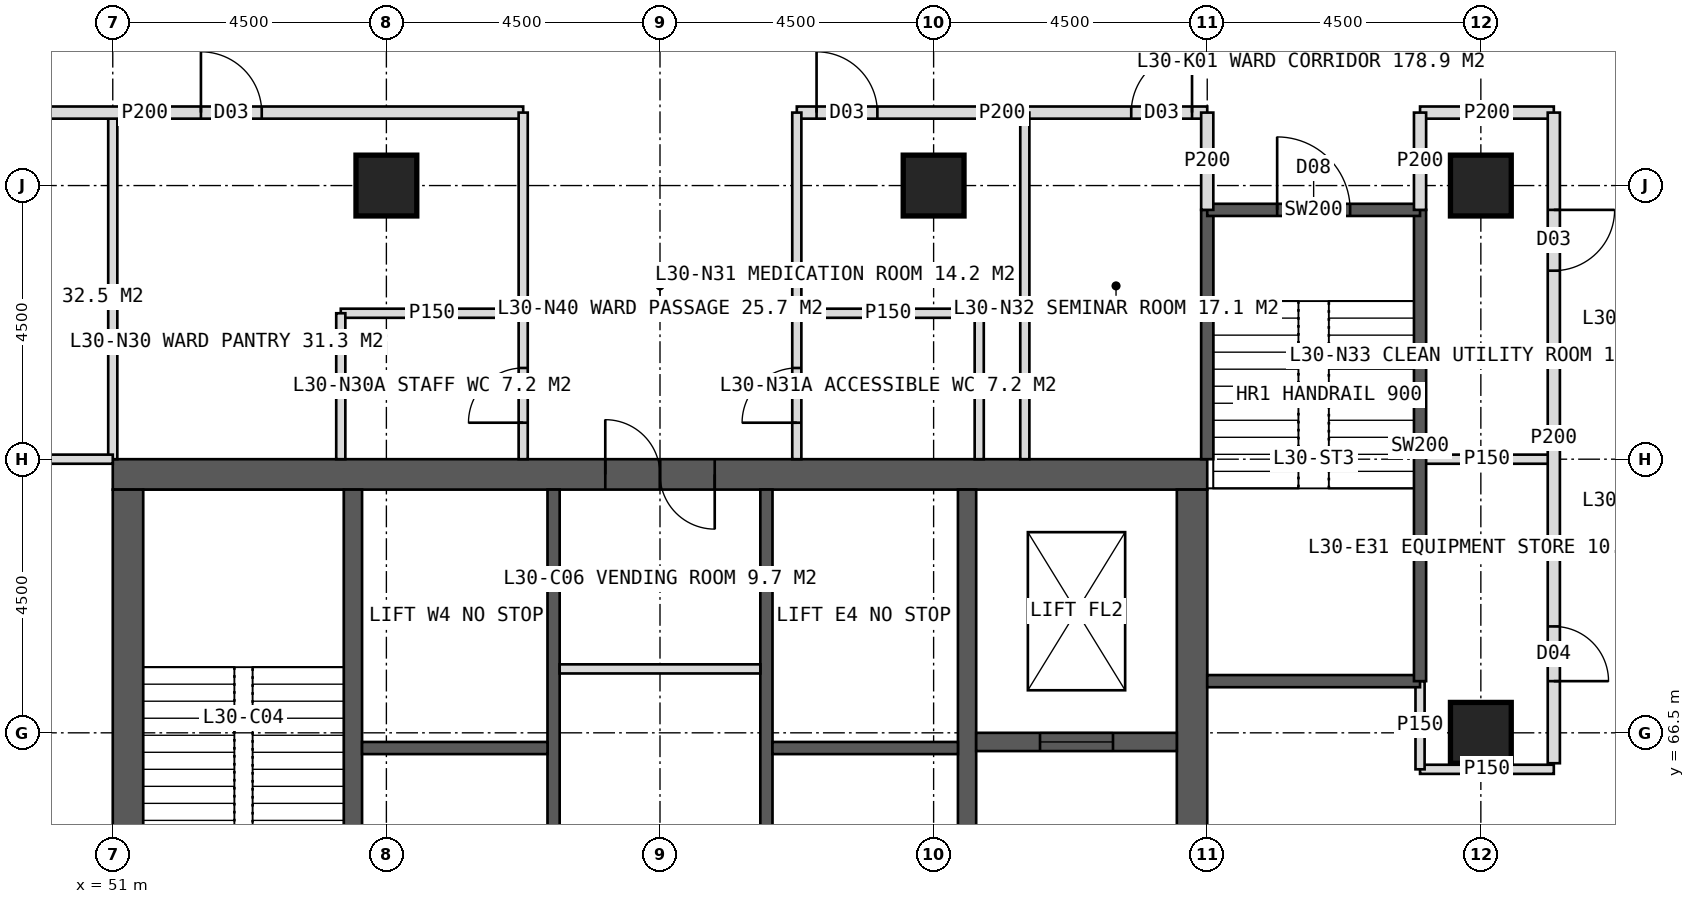
"""IFC4 building model, lengths in metres.
Left out: names, types, materials, properties, quantities, classifications, styles, units other than length and angle.
Written with IfcOpenShell. Run it as: python <this file> out.ifc"""

import sys

from ifc_helpers import new_model, si_unit, direction, frame, frame_2d, origin, origin_2d, place, context, subcontext, project, spatial, rectangle, hollow_rectangle, extrude, element, fill, save


model = new_model("IFC4")
c1 = context("Model", 3, precision=1e-05, world=origin(), true_north=direction((0.0, 1.0)))
c2 = subcontext(c1, "Body", "Model", "MODEL_VIEW")
j1 = project(units=[si_unit("LENGTHUNIT", "METRE"), si_unit("PLANEANGLEUNIT", "RADIAN")], contexts=[c1])
p1 = place(None, origin())
s1 = spatial("IfcSite", under=j1, at=p1, CompositionType="ELEMENT")
p2 = place(p1, origin())
s2 = spatial("IfcBuilding", under=s1, at=p2, CompositionType="ELEMENT")
p3 = place(p2, frame((0.0, 0.0, 128.0)))
s3 = spatial("IfcBuildingStorey", under=s2, at=p3, CompositionType="ELEMENT", Elevation=128.0)
p4 = place(p3, frame((51.0, 70.75, 0.0), z_axis=(0.0, 0.0, 1.0), x_axis=(1.0, 0.0, 0.0)))
e1 = element("IfcWall", 1, at=p4, inside=s3, PredefinedType="SHEAR", context=c2, shape_type="SweptSolid", body=[
    extrude(rectangle(XDim=18.0, YDim=0.5, at=frame_2d((9.0, 0.0))), origin(), (0.0, 0.0, 1.0), 4.0),
])
p5 = place(p4, frame((8.1, 0.0, 0.0)))
e2 = element("IfcOpeningElement", 2, at=p5, cuts=e1, PredefinedType="OPENING", context=c2, shape_type="SweptSolid", body=[
    extrude(rectangle(XDim=1.8, YDim=2.2, at=frame_2d((0.9, 1.1))), frame((0.0, 0.26, 0.0), z_axis=(0.0, -1.0, 0.0), x_axis=(1.0, 0.0, 0.0)), (0.0, 0.0, 1.0), 0.52),
])
p6 = place(p3, frame((51.25, 53.5, 0.0), z_axis=(0.0, 0.0, 1.0), x_axis=(0.0, 1.0, 0.0)))
e3 = element("IfcWall", 3, at=p6, inside=s3, PredefinedType="SHEAR", context=c2, shape_type="SweptSolid", body=[
    extrude(rectangle(XDim=17.0, YDim=0.5, at=frame_2d((8.5, 0.0))), origin(), (0.0, 0.0, 1.0), 4.0),
])
p7 = place(p6, frame((6.0, 0.0, 0.0)))
e4 = element("IfcOpeningElement", 4, at=p7, cuts=e3, PredefinedType="OPENING", context=c2, shape_type="SweptSolid", body=[
    extrude(rectangle(XDim=1.5, YDim=2.2, at=frame_2d((0.75, 1.1))), frame((0.0, 0.26, 0.0), z_axis=(0.0, -1.0, 0.0), x_axis=(1.0, 0.0, 0.0)), (0.0, 0.0, 1.0), 0.52),
])
p8 = place(p3, frame((68.75, 53.5, 0.0), z_axis=(0.0, 0.0, 1.0), x_axis=(0.0, 1.0, 0.0)))
e5 = element("IfcWall", 5, at=p8, inside=s3, PredefinedType="SHEAR", context=c2, shape_type="SweptSolid", body=[
    extrude(rectangle(XDim=17.0, YDim=0.5, at=frame_2d((8.5, 0.0))), origin(), (0.0, 0.0, 1.0), 4.0),
])
p9 = place(p8, frame((9.5, 0.0, 0.0)))
e6 = element("IfcOpeningElement", 6, at=p9, cuts=e5, PredefinedType="OPENING", context=c2, shape_type="SweptSolid", body=[
    extrude(rectangle(XDim=1.5, YDim=2.2, at=frame_2d((0.75, 1.1))), frame((0.0, 0.26, 0.0), z_axis=(0.0, -1.0, 0.0), x_axis=(1.0, 0.0, 0.0)), (0.0, 0.0, 1.0), 0.52),
])
for number, where, z_axis, x_axis in (
    (7, (54.95, 53.5, 0.0), (0.0, 0.0, 1.0), (0.0, 1.0, 0.0)),
    (8, (65.05, 53.5, 0.0), (0.0, 0.0, 1.0), (0.0, 1.0, 0.0)),
):
    element("IfcWall", number, at=place(p3, frame(where, z_axis=z_axis, x_axis=x_axis)), inside=s3, PredefinedType="SHEAR", context=c2, shape_type="SweptSolid", body=[
        extrude(rectangle(XDim=17.0, YDim=0.3, at=frame_2d((8.5, 0.0))), origin(), (0.0, 0.0, 1.0), 4.0),
    ])
p10 = place(p3, frame((58.25, 53.5, 0.0), z_axis=(0.0, 0.0, 1.0), x_axis=(0.0, 1.0, 0.0)))
e9 = element("IfcWall", 9, at=p10, inside=s3, PredefinedType="SHEAR", context=c2, shape_type="SweptSolid", body=[
    extrude(rectangle(XDim=17.0, YDim=0.2, at=frame_2d((8.5, 0.0))), origin(), (0.0, 0.0, 1.0), 4.0),
])
p11 = place(p10, frame((1.375, 0.0, 0.0)))
e10 = element("IfcOpeningElement", 10, at=p11, cuts=e9, PredefinedType="OPENING", context=c2, shape_type="SweptSolid", body=[
    extrude(rectangle(XDim=1.4, YDim=2.2, at=frame_2d((0.7, 1.1))), frame((0.0, 0.11, 0.0), z_axis=(0.0, -1.0, 0.0), x_axis=(1.0, 0.0, 0.0)), (0.0, 0.0, 1.0), 0.22),
])
p12 = place(p10, frame((5.675, 0.0, 0.0)))
e11 = element("IfcOpeningElement", 11, at=p12, cuts=e9, PredefinedType="OPENING", context=c2, shape_type="SweptSolid", body=[
    extrude(rectangle(XDim=1.4, YDim=2.2, at=frame_2d((0.7, 1.1))), frame((0.0, 0.11, 0.0), z_axis=(0.0, -1.0, 0.0), x_axis=(1.0, 0.0, 0.0)), (0.0, 0.0, 1.0), 0.22),
])
p13 = place(p3, frame((61.75, 53.5, 0.0), z_axis=(0.0, 0.0, 1.0), x_axis=(0.0, 1.0, 0.0)))
e12 = element("IfcWall", 12, at=p13, inside=s3, PredefinedType="SHEAR", context=c2, shape_type="SweptSolid", body=[
    extrude(rectangle(XDim=17.0, YDim=0.2, at=frame_2d((8.5, 0.0))), origin(), (0.0, 0.0, 1.0), 4.0),
])
p14 = place(p13, frame((1.375, 0.0, 0.0)))
e13 = element("IfcOpeningElement", 13, at=p14, cuts=e12, PredefinedType="OPENING", context=c2, shape_type="SweptSolid", body=[
    extrude(rectangle(XDim=1.4, YDim=2.2, at=frame_2d((0.7, 1.1))), frame((0.0, 0.11, 0.0), z_axis=(0.0, -1.0, 0.0), x_axis=(1.0, 0.0, 0.0)), (0.0, 0.0, 1.0), 0.22),
])
p15 = place(p13, frame((5.675, 0.0, 0.0)))
e14 = element("IfcOpeningElement", 14, at=p15, cuts=e12, PredefinedType="OPENING", context=c2, shape_type="SweptSolid", body=[
    extrude(rectangle(XDim=1.4, YDim=2.2, at=frame_2d((0.7, 1.1))), frame((0.0, 0.11, 0.0), z_axis=(0.0, -1.0, 0.0), x_axis=(1.0, 0.0, 0.0)), (0.0, 0.0, 1.0), 0.22),
])
for number, where, z_axis, x_axis in (
    (15, (55.1, 66.25, 0.0), (0.0, 0.0, 1.0), (1.0, 0.0, 0.0)),
    (16, (61.85, 66.25, 0.0), (0.0, 0.0, 1.0), (1.0, 0.0, 0.0)),
):
    element("IfcWall", number, at=place(p3, frame(where, z_axis=z_axis, x_axis=x_axis)), inside=s3, PredefinedType="SHEAR", context=c2, shape_type="SweptSolid", body=[
        extrude(rectangle(XDim=3.05, YDim=0.2, at=frame_2d((1.525, 0.0))), origin(), (0.0, 0.0, 1.0), 4.0),
    ])
p16 = place(p3, frame((65.2, 66.35, 0.0), z_axis=(0.0, 0.0, 1.0), x_axis=(1.0, 0.0, 0.0)))
e17 = element("IfcWall", 17, at=p16, inside=s3, PredefinedType="SHEAR", context=c2, shape_type="SweptSolid", body=[
    extrude(rectangle(XDim=3.3, YDim=0.3, at=frame_2d((1.65, 0.0))), origin(), (0.0, 0.0, 1.0), 4.0),
])
p17 = place(p16, frame((1.05, 0.0, 0.0)))
e18 = element("IfcOpeningElement", 18, at=p17, cuts=e17, PredefinedType="OPENING", context=c2, shape_type="SweptSolid", body=[
    extrude(rectangle(XDim=1.2, YDim=2.2, at=frame_2d((0.6, 1.1))), frame((0.0, 0.16, 0.0), z_axis=(0.0, -1.0, 0.0), x_axis=(1.0, 0.0, 0.0)), (0.0, 0.0, 1.0), 0.32),
])
for number, where, z_axis, x_axis in (
    (19, (73.5, 75.5, 0.0), (0.0, 0.0, 1.0), (1.0, 0.0, 0.0)),
    (20, (55.5, 75.5, 0.0), (0.0, 0.0, 1.0), (1.0, 0.0, 0.0)),
    (21, (64.5, 75.5, 0.0), (0.0, 0.0, 1.0), (1.0, 0.0, 0.0)),
    (22, (73.5, 66.5, 0.0), (0.0, 0.0, 1.0), (1.0, 0.0, 0.0)),
):
    element("IfcColumn", number, at=place(p3, frame(where, z_axis=z_axis, x_axis=x_axis)), inside=s3, PredefinedType="COLUMN", context=c2, shape_type="SweptSolid", body=[
        extrude(hollow_rectangle(XDim=1.0, YDim=1.0, WallThickness=0.1, at=origin_2d()), origin(), (0.0, 0.0, 1.0), 4.0),
    ])
p18 = place(p3, frame((51.0, 71.0, 0.0), z_axis=(0.0, 0.0, 1.0), x_axis=(0.0, 1.0, 0.0)))
e23 = element("IfcWall", 23, at=p18, inside=s3, PredefinedType="PARTITIONING", context=c2, shape_type="SweptSolid", body=[
    extrude(rectangle(XDim=5.7, YDim=0.15, at=frame_2d((2.85, 0.0))), origin(), (0.0, 0.0, 1.0), 3.75),
])
p19 = place(p3, frame((45.3, 76.7, 0.0), z_axis=(0.0, 0.0, 1.0), x_axis=(1.0, 0.0, 0.0)))
e24 = element("IfcWall", 24, at=p19, inside=s3, PredefinedType="PARTITIONING", context=c2, shape_type="SweptSolid", body=[
    extrude(rectangle(XDim=12.45, YDim=0.2, at=frame_2d((6.225, 0.0))), origin(), (0.0, 0.0, 1.0), 3.75),
])
p20 = place(p19, frame((7.15, 0.0, 0.0)))
e25 = element("IfcOpeningElement", 25, at=p20, cuts=e24, PredefinedType="OPENING", context=c2, shape_type="SweptSolid", body=[
    extrude(rectangle(XDim=1.0, YDim=2.1, at=frame_2d((0.5, 1.05))), frame((0.0, 0.11, 0.0), z_axis=(0.0, -1.0, 0.0), x_axis=(1.0, 0.0, 0.0)), (0.0, 0.0, 1.0), 0.22),
])
p21 = place(p3, frame((62.25, 76.7, 0.0), z_axis=(0.0, 0.0, 1.0), x_axis=(1.0, 0.0, 0.0)))
e26 = element("IfcWall", 26, at=p21, inside=s3, PredefinedType="PARTITIONING", context=c2, shape_type="SweptSolid", body=[
    extrude(rectangle(XDim=6.75, YDim=0.2, at=frame_2d((3.375, 0.0))), origin(), (0.0, 0.0, 1.0), 3.75),
])
p22 = place(p21, frame((0.325, 0.0, 0.0)))
e27 = element("IfcOpeningElement", 27, at=p22, cuts=e26, PredefinedType="OPENING", context=c2, shape_type="SweptSolid", body=[
    extrude(rectangle(XDim=1.0, YDim=2.1, at=frame_2d((0.5, 1.05))), frame((0.0, 0.11, 0.0), z_axis=(0.0, -1.0, 0.0), x_axis=(1.0, 0.0, 0.0)), (0.0, 0.0, 1.0), 0.22),
])
p23 = place(p21, frame((5.5, 0.0, 0.0)))
e28 = element("IfcOpeningElement", 28, at=p23, cuts=e26, PredefinedType="OPENING", context=c2, shape_type="SweptSolid", body=[
    extrude(rectangle(XDim=1.0, YDim=2.1, at=frame_2d((0.5, 1.05))), frame((0.0, 0.11, 0.0), z_axis=(0.0, -1.0, 0.0), x_axis=(1.0, 0.0, 0.0)), (0.0, 0.0, 1.0), 0.22),
])
p24 = place(p3, frame((72.5, 76.7, 0.0), z_axis=(0.0, 0.0, 1.0), x_axis=(1.0, 0.0, 0.0)))
e29 = element("IfcWall", 29, at=p24, inside=s3, PredefinedType="PARTITIONING", context=c2, shape_type="SweptSolid", body=[
    extrude(rectangle(XDim=2.2, YDim=0.2, at=frame_2d((1.1, 0.0))), origin(), (0.0, 0.0, 1.0), 3.75),
])
p25 = place(p3, frame((57.75, 71.0, 0.0), z_axis=(0.0, 0.0, 1.0), x_axis=(0.0, 1.0, 0.0)))
e30 = element("IfcWall", 30, at=p25, inside=s3, PredefinedType="PARTITIONING", context=c2, shape_type="SweptSolid", body=[
    extrude(rectangle(XDim=5.7, YDim=0.15, at=frame_2d((2.85, 0.0))), origin(), (0.0, 0.0, 1.0), 3.75),
])
p26 = place(p25, frame((0.6, 0.0, 0.0)))
e31 = element("IfcOpeningElement", 31, at=p26, cuts=e30, PredefinedType="OPENING", context=c2, shape_type="SweptSolid", body=[
    extrude(rectangle(XDim=0.9, YDim=2.1, at=frame_2d((0.45, 1.05))), frame((0.0, 0.085, 0.0), z_axis=(0.0, -1.0, 0.0), x_axis=(1.0, 0.0, 0.0)), (0.0, 0.0, 1.0), 0.17),
])
p27 = place(p3, frame((62.25, 71.0, 0.0), z_axis=(0.0, 0.0, 1.0), x_axis=(0.0, 1.0, 0.0)))
e32 = element("IfcWall", 32, at=p27, inside=s3, PredefinedType="PARTITIONING", context=c2, shape_type="SweptSolid", body=[
    extrude(rectangle(XDim=5.7, YDim=0.15, at=frame_2d((2.85, 0.0))), origin(), (0.0, 0.0, 1.0), 3.75),
])
p28 = place(p27, frame((0.6, 0.0, 0.0)))
e33 = element("IfcOpeningElement", 33, at=p28, cuts=e32, PredefinedType="OPENING", context=c2, shape_type="SweptSolid", body=[
    extrude(rectangle(XDim=0.9, YDim=2.1, at=frame_2d((0.45, 1.05))), frame((0.0, 0.085, 0.0), z_axis=(0.0, -1.0, 0.0), x_axis=(1.0, 0.0, 0.0)), (0.0, 0.0, 1.0), 0.17),
])
p29 = place(p3, frame((66.0, 71.0, 0.0), z_axis=(0.0, 0.0, 1.0), x_axis=(0.0, 1.0, 0.0)))
e34 = element("IfcWall", 34, at=p29, inside=s3, PredefinedType="PARTITIONING", context=c2, shape_type="SweptSolid", body=[
    extrude(rectangle(XDim=5.7, YDim=0.15, at=frame_2d((2.85, 0.0))), origin(), (0.0, 0.0, 1.0), 3.75),
])
p30 = place(p3, frame((54.75, 73.4, 0.0), z_axis=(0.0, 0.0, 1.0), x_axis=(1.0, 0.0, 0.0)))
e35 = element("IfcWall", 35, at=p30, inside=s3, PredefinedType="PARTITIONING", context=c2, shape_type="SweptSolid", body=[
    extrude(rectangle(XDim=3.0, YDim=0.15, at=frame_2d((1.5, 0.0))), origin(), (0.0, 0.0, 1.0), 3.75),
])
p31 = place(p3, frame((54.75, 71.0, 0.0), z_axis=(0.0, 0.0, 1.0), x_axis=(0.0, 1.0, 0.0)))
e36 = element("IfcWall", 36, at=p31, inside=s3, PredefinedType="PARTITIONING", context=c2, shape_type="SweptSolid", body=[
    extrude(rectangle(XDim=2.4, YDim=0.15, at=frame_2d((1.2, 0.0))), origin(), (0.0, 0.0, 1.0), 3.75),
])
p32 = place(p3, frame((62.25, 73.4, 0.0), z_axis=(0.0, 0.0, 1.0), x_axis=(1.0, 0.0, 0.0)))
e37 = element("IfcWall", 37, at=p32, inside=s3, PredefinedType="PARTITIONING", context=c2, shape_type="SweptSolid", body=[
    extrude(rectangle(XDim=3.0, YDim=0.15, at=frame_2d((1.5, 0.0))), origin(), (0.0, 0.0, 1.0), 3.75),
])
p33 = place(p3, frame((65.25, 71.0, 0.0), z_axis=(0.0, 0.0, 1.0), x_axis=(0.0, 1.0, 0.0)))
e38 = element("IfcWall", 38, at=p33, inside=s3, PredefinedType="PARTITIONING", context=c2, shape_type="SweptSolid", body=[
    extrude(rectangle(XDim=2.4, YDim=0.15, at=frame_2d((1.2, 0.0))), origin(), (0.0, 0.0, 1.0), 3.75),
])
p34 = place(p3, frame((51.0, 71.0, 0.0), z_axis=(0.0, 0.0, 1.0), x_axis=(-1.0, 0.0, 0.0)))
e39 = element("IfcWall", 39, at=p34, inside=s3, PredefinedType="PARTITIONING", context=c2, shape_type="SweptSolid", body=[
    extrude(rectangle(XDim=5.7, YDim=0.15, at=frame_2d((2.85, 0.0))), origin(), (0.0, 0.0, 1.0), 3.75),
])
p35 = place(p3, frame((72.5, 71.0, 0.0), z_axis=(0.0, 0.0, 1.0), x_axis=(1.0, 0.0, 0.0)))
e40 = element("IfcWall", 40, at=p35, inside=s3, PredefinedType="PARTITIONING", context=c2, shape_type="SweptSolid", body=[
    extrude(rectangle(XDim=2.2, YDim=0.15, at=frame_2d((1.1, 0.0))), origin(), (0.0, 0.0, 1.0), 3.75),
])
p36 = place(p3, frame((74.7, 76.7, 0.0), z_axis=(0.0, 0.0, 1.0), x_axis=(0.0, -1.0, 0.0)))
e41 = element("IfcWall", 41, at=p36, inside=s3, PredefinedType="PARTITIONING", context=c2, shape_type="SweptSolid", body=[
    extrude(rectangle(XDim=10.7, YDim=0.2, at=frame_2d((5.35, 0.0))), origin(), (0.0, 0.0, 1.0), 3.75),
])
p37 = place(p36, frame((1.6, 0.0, 0.0)))
e42 = element("IfcOpeningElement", 42, at=p37, cuts=e41, PredefinedType="OPENING", context=c2, shape_type="SweptSolid", body=[
    extrude(rectangle(XDim=1.0, YDim=2.1, at=frame_2d((0.5, 1.05))), frame((0.0, 0.11, 0.0), z_axis=(0.0, -1.0, 0.0), x_axis=(1.0, 0.0, 0.0)), (0.0, 0.0, 1.0), 0.22),
])
p38 = place(p36, frame((8.45, 0.0, 0.0)))
e43 = element("IfcOpeningElement", 43, at=p38, cuts=e41, PredefinedType="OPENING", context=c2, shape_type="SweptSolid", body=[
    extrude(rectangle(XDim=0.9, YDim=2.1, at=frame_2d((0.45, 1.05))), frame((0.0, 0.11, 0.0), z_axis=(0.0, -1.0, 0.0), x_axis=(1.0, 0.0, 0.0)), (0.0, 0.0, 1.0), 0.22),
])
p39 = place(p3, frame((72.5, 65.9, 0.0), z_axis=(0.0, 0.0, 1.0), x_axis=(1.0, 0.0, 0.0)))
e44 = element("IfcWall", 44, at=p39, inside=s3, PredefinedType="PARTITIONING", context=c2, shape_type="SweptSolid", body=[
    extrude(rectangle(XDim=2.2, YDim=0.15, at=frame_2d((1.1, 0.0))), origin(), (0.0, 0.0, 1.0), 3.75),
])
p40 = place(p3, frame((58.35, 67.551, 0.0), z_axis=(0.0, 0.0, 1.0), x_axis=(1.0, 0.0, 0.0)))
e45 = element("IfcWall", 45, at=p40, inside=s3, PredefinedType="PARTITIONING", context=c2, shape_type="SweptSolid", body=[
    extrude(rectangle(XDim=3.3, YDim=0.15, at=frame_2d((1.65, 0.0))), origin(), (0.0, 0.0, 1.0), 3.75),
])
p41 = place(p3, frame((72.5, 65.9, 0.0), z_axis=(0.0, 0.0, 1.0), x_axis=(0.0, 1.0, 0.0)))
e46 = element("IfcWall", 46, at=p41, inside=s3, PredefinedType="PARTITIONING", context=c2, shape_type="SweptSolid", body=[
    extrude(rectangle(XDim=1.45, YDim=0.15, at=frame_2d((0.725, 0.0))), origin(), (0.0, 0.0, 1.0), 3.75),
])
p42 = place(p3, frame((69.0, 71.0, 0.0), z_axis=(0.0, 0.0, 1.0), x_axis=(0.0, 1.0, 0.0)))
e47 = element("IfcWall", 47, at=p42, inside=s3, PredefinedType="SOLIDWALL", context=c2, shape_type="SweptSolid", body=[
    extrude(rectangle(XDim=4.1, YDim=0.2, at=frame_2d((2.05, 0.0))), origin(), (0.0, 0.0, 1.0), 3.75),
])
p43 = place(p3, frame((69.0, 67.35, 0.0), z_axis=(0.0, 0.0, 1.0), x_axis=(1.0, 0.0, 0.0)))
e48 = element("IfcWall", 48, at=p43, inside=s3, PredefinedType="SOLIDWALL", context=c2, shape_type="SweptSolid", body=[
    extrude(rectangle(XDim=3.5, YDim=0.2, at=frame_2d((1.75, 0.0))), origin(), (0.0, 0.0, 1.0), 3.75),
])
p44 = place(p3, frame((72.5, 67.35, 0.0), z_axis=(0.0, 0.0, 1.0), x_axis=(0.0, 1.0, 0.0)))
e49 = element("IfcWall", 49, at=p44, inside=s3, PredefinedType="SOLIDWALL", context=c2, shape_type="SweptSolid", body=[
    extrude(rectangle(XDim=7.75, YDim=0.2, at=frame_2d((3.875, 0.0))), origin(), (0.0, 0.0, 1.0), 3.75),
])
p45 = place(p3, frame((69.0, 75.1, 0.0), z_axis=(0.0, 0.0, 1.0), x_axis=(1.0, 0.0, 0.0)))
e50 = element("IfcWall", 50, at=p45, inside=s3, PredefinedType="SOLIDWALL", context=c2, shape_type="SweptSolid", body=[
    extrude(rectangle(XDim=3.5, YDim=0.2, at=frame_2d((1.75, 0.0))), origin(), (0.0, 0.0, 1.0), 3.75),
])
p46 = place(p45, frame((1.15, 0.0, 0.0)))
e51 = element("IfcOpeningElement", 51, at=p46, cuts=e50, PredefinedType="OPENING", context=c2, shape_type="SweptSolid", body=[
    extrude(rectangle(XDim=1.2, YDim=2.1, at=frame_2d((0.6, 1.05))), frame((0.0, 0.11, 0.0), z_axis=(0.0, -1.0, 0.0), x_axis=(1.0, 0.0, 0.0)), (0.0, 0.0, 1.0), 0.22),
])
for number, where, z_axis, x_axis in (
    (52, (69.0, 75.1, 0.0), (0.0, 0.0, 1.0), (0.0, 1.0, 0.0)),
    (53, (72.5, 75.1, 0.0), (0.0, 0.0, 1.0), (0.0, 1.0, 0.0)),
):
    element("IfcWall", number, at=place(p3, frame(where, z_axis=z_axis, x_axis=x_axis)), inside=s3, PredefinedType="PARTITIONING", context=c2, shape_type="SweptSolid", body=[
        extrude(rectangle(XDim=1.6, YDim=0.2, at=frame_2d((0.8, 0.0))), origin(), (0.0, 0.0, 1.0), 3.75),
    ])
p47 = place(p26, origin())
e54 = element("IfcDoor", 54, at=p47, inside=s3, OperationType="SINGLE_SWING_LEFT", PredefinedType="DOOR", context=c2, shape_type="SweptSolid", body=[
    extrude(rectangle(XDim=0.9, YDim=2.1, at=frame_2d((0.45, 1.05))), frame((0.0, 0.025, 0.0), z_axis=(0.0, -1.0, 0.0), x_axis=(1.0, 0.0, 0.0)), (0.0, 0.0, 1.0), 0.05),
])
fill(e31, e54)
p48 = place(p20, origin())
e55 = element("IfcDoor", 55, at=p48, inside=s3, OperationType="SINGLE_SWING_LEFT", PredefinedType="DOOR", context=c2, shape_type="SweptSolid", body=[
    extrude(rectangle(XDim=1.0, YDim=2.1, at=frame_2d((0.5, 1.05))), frame((0.0, 0.025, 0.0), z_axis=(0.0, -1.0, 0.0), x_axis=(1.0, 0.0, 0.0)), (0.0, 0.0, 1.0), 0.05),
])
fill(e25, e55)
p49 = place(p28, origin())
e56 = element("IfcDoor", 56, at=p49, inside=s3, OperationType="SINGLE_SWING_LEFT", PredefinedType="DOOR", context=c2, shape_type="SweptSolid", body=[
    extrude(rectangle(XDim=0.9, YDim=2.1, at=frame_2d((0.45, 1.05))), frame((0.0, 0.025, 0.0), z_axis=(0.0, -1.0, 0.0), x_axis=(1.0, 0.0, 0.0)), (0.0, 0.0, 1.0), 0.05),
])
fill(e33, e56)
p50 = place(p22, origin())
e57 = element("IfcDoor", 57, at=p50, inside=s3, OperationType="SINGLE_SWING_LEFT", PredefinedType="DOOR", context=c2, shape_type="SweptSolid", body=[
    extrude(rectangle(XDim=1.0, YDim=2.1, at=frame_2d((0.5, 1.05))), frame((0.0, 0.025, 0.0), z_axis=(0.0, -1.0, 0.0), x_axis=(1.0, 0.0, 0.0)), (0.0, 0.0, 1.0), 0.05),
])
fill(e27, e57)
p51 = place(p23, origin())
e58 = element("IfcDoor", 58, at=p51, inside=s3, OperationType="SINGLE_SWING_RIGHT", PredefinedType="DOOR", context=c2, shape_type="SweptSolid", body=[
    extrude(rectangle(XDim=1.0, YDim=2.1, at=frame_2d((0.5, 1.05))), frame((0.0, 0.025, 0.0), z_axis=(0.0, -1.0, 0.0), x_axis=(1.0, 0.0, 0.0)), (0.0, 0.0, 1.0), 0.05),
])
fill(e28, e58)
p52 = place(p37, origin())
e59 = element("IfcDoor", 59, at=p52, inside=s3, OperationType="SINGLE_SWING_LEFT", PredefinedType="DOOR", context=c2, shape_type="SweptSolid", body=[
    extrude(rectangle(XDim=1.0, YDim=2.1, at=frame_2d((0.5, 1.05))), frame((0.0, 0.025, 0.0), z_axis=(0.0, -1.0, 0.0), x_axis=(1.0, 0.0, 0.0)), (0.0, 0.0, 1.0), 0.05),
])
fill(e42, e59)
p53 = place(p38, origin())
e60 = element("IfcDoor", 60, at=p53, inside=s3, OperationType="SINGLE_SWING_RIGHT", PredefinedType="DOOR", context=c2, shape_type="SweptSolid", body=[
    extrude(rectangle(XDim=0.9, YDim=2.1, at=frame_2d((0.45, 1.05))), frame((0.0, 0.025, 0.0), z_axis=(0.0, -1.0, 0.0), x_axis=(1.0, 0.0, 0.0)), (0.0, 0.0, 1.0), 0.05),
])
fill(e43, e60)
p54 = place(p17, origin())
e61 = element("IfcDoor", 61, at=p54, inside=s3, OperationType="SLIDING_TO_LEFT", PredefinedType="DOOR", context=c2, shape_type="SweptSolid", body=[
    extrude(rectangle(XDim=1.2, YDim=2.2, at=frame_2d((0.6, 1.1))), frame((0.0, 0.025, 0.0), z_axis=(0.0, -1.0, 0.0), x_axis=(1.0, 0.0, 0.0)), (0.0, 0.0, 1.0), 0.05),
])
fill(e18, e61)
p55 = place(p5, origin())
e62 = element("IfcDoor", 62, at=p55, inside=s3, OperationType="DOUBLE_DOOR_SINGLE_SWING", PredefinedType="DOOR", context=c2, shape_type="SweptSolid", body=[
    extrude(rectangle(XDim=1.8, YDim=2.2, at=frame_2d((0.9, 1.1))), frame((0.0, 0.025, 0.0), z_axis=(0.0, -1.0, 0.0), x_axis=(1.0, 0.0, 0.0)), (0.0, 0.0, 1.0), 0.05),
])
fill(e2, e62)
p56 = place(p46, origin())
e63 = element("IfcDoor", 63, at=p56, inside=s3, OperationType="SINGLE_SWING_LEFT", PredefinedType="DOOR", context=c2, shape_type="SweptSolid", body=[
    extrude(rectangle(XDim=1.2, YDim=2.1, at=frame_2d((0.6, 1.05))), frame((0.0, 0.025, 0.0), z_axis=(0.0, -1.0, 0.0), x_axis=(1.0, 0.0, 0.0)), (0.0, 0.0, 1.0), 0.05),
])
fill(e51, e63)
save(model, sys.argv[1])
